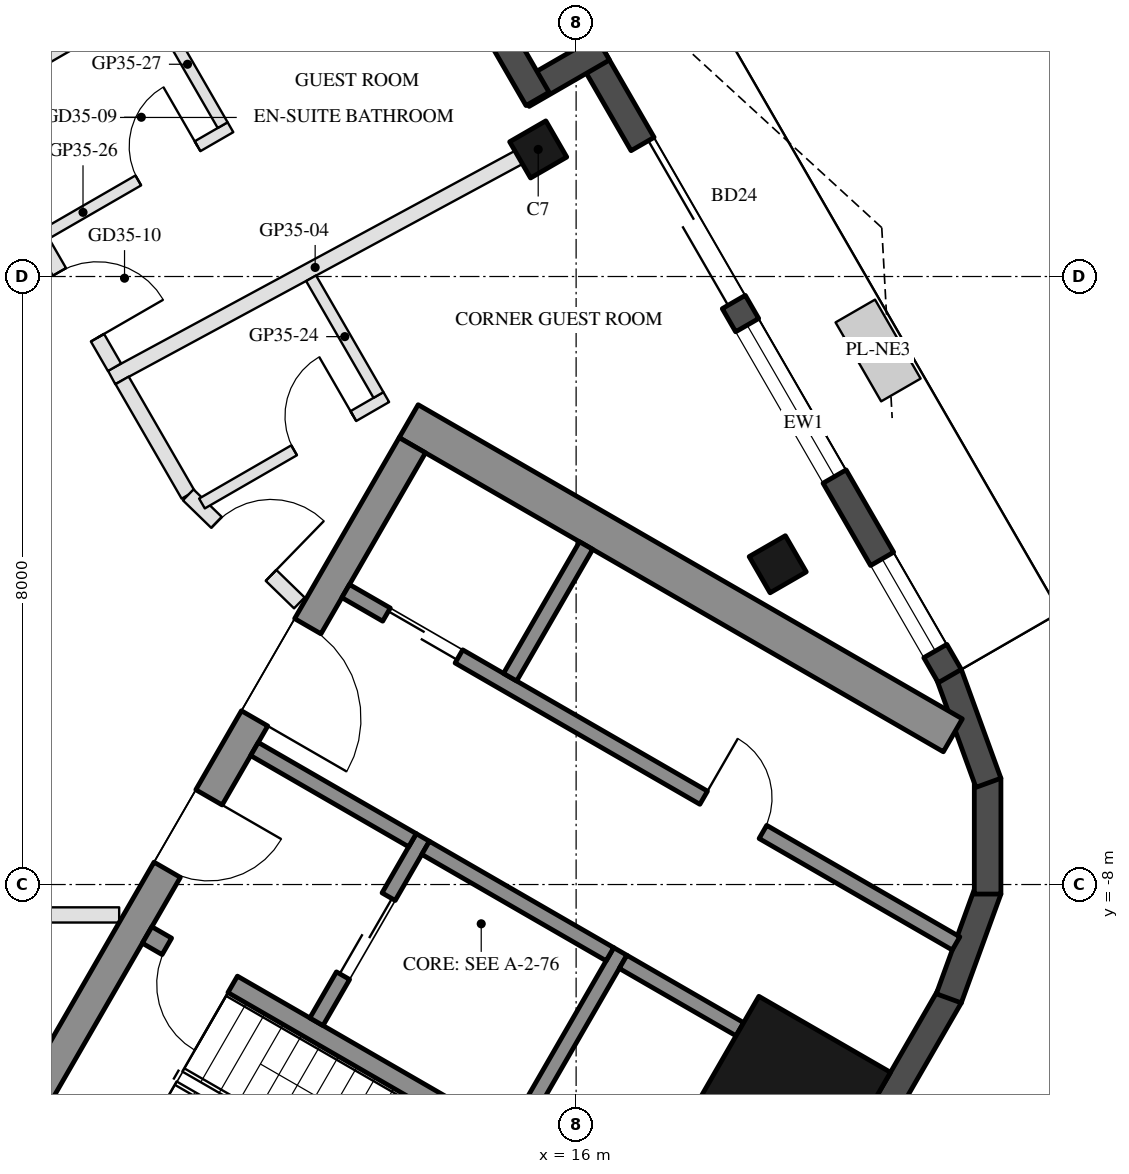
"""IFC4 building model, lengths in metres.
Left out: names, types, materials, properties, quantities, classifications, styles, units other than length and angle.
Written with IfcOpenShell. Run it as: python <this file> out.ifc"""

import sys

from ifc_helpers import new_model, si_unit, direction, frame, frame_2d, origin, origin_2d, place, context, subcontext, project, spatial, rectangle, hollow_rectangle, extrude, boolean, halfspace, element, fill, save


model = new_model("IFC4")
c1 = context("Model", 3, precision=1e-05, world=origin(), true_north=direction((0.0, 1.0)))
c2 = subcontext(c1, "Body", "Model", "MODEL_VIEW")
j1 = project(units=[si_unit("LENGTHUNIT", "METRE"), si_unit("PLANEANGLEUNIT", "RADIAN")], contexts=[c1])
p1 = place(None, origin())
s1 = spatial("IfcSite", under=j1, at=p1, CompositionType="ELEMENT")
p2 = place(p1, origin())
s2 = spatial("IfcBuilding", under=s1, at=p2, CompositionType="ELEMENT")
p3 = place(p2, frame((0.0, 0.0, 324.4)))
s3 = spatial("IfcBuildingStorey", under=s2, at=p3, CompositionType="ELEMENT", Elevation=324.4)
p4 = place(p3, frame((18.652, -3.786, 0.0), z_axis=(0.0, 0.0, 1.0), x_axis=(-0.5, 0.866025403784, 0.0)))
e1 = element("IfcColumn", 1, at=p4, inside=s3, PredefinedType="COLUMN", context=c2, shape_type="SweptSolid", body=[
    boolean("DIFFERENCE", boolean("DIFFERENCE", extrude(hollow_rectangle(XDim=0.55, YDim=0.55, WallThickness=0.025, at=origin_2d()), origin(), (0.0, 0.0, 1.0), 3.7), halfspace(frame((0.0, 0.0, 0.04), z_axis=(0.0, 0.0, 1.0), x_axis=(1.0, 0.0, 0.0)), True)), halfspace(frame((0.0, 0.0, 3.66), z_axis=(0.0, 0.0, 1.0), x_axis=(1.0, 0.0, 0.0)), False)),
])
p5 = place(p3, frame((15.501, 1.672, 0.0), z_axis=(0.0, 0.0, 1.0), x_axis=(-0.5, 0.866025403784, 0.0)))
e2 = element("IfcColumn", 2, at=p5, inside=s3, PredefinedType="COLUMN", context=c2, shape_type="SweptSolid", body=[
    boolean("DIFFERENCE", boolean("DIFFERENCE", extrude(hollow_rectangle(XDim=0.55, YDim=0.55, WallThickness=0.025, at=origin_2d()), origin(), (0.0, 0.0, 1.0), 3.7), halfspace(frame((0.0, 0.0, 0.034), z_axis=(0.0, 0.0, 1.0), x_axis=(1.0, 0.0, 0.0)), True)), halfspace(frame((0.0, 0.0, 3.666), z_axis=(0.0, 0.0, 1.0), x_axis=(1.0, 0.0, 0.0)), False)),
])
p6 = place(p3, frame((18.77, -10.837, 0.0), z_axis=(0.0, 0.0, 1.0), x_axis=(0.5, 0.866025403784, 0.0)))
e3 = element("IfcColumn", 3, at=p6, inside=s3, PredefinedType="COLUMN", context=c2, shape_type="SweptSolid", body=[
    boolean("DIFFERENCE", boolean("DIFFERENCE", extrude(hollow_rectangle(XDim=2.0, YDim=2.0, WallThickness=0.05, at=origin_2d()), origin(), (0.0, 0.0, 1.0), 3.7), halfspace(frame((0.0, 0.0, 0.113), z_axis=(0.0, 0.0, 1.0), x_axis=(1.0, 0.0, 0.0)), True)), halfspace(frame((0.0, 0.0, 3.587), z_axis=(0.0, 0.0, 1.0), x_axis=(1.0, 0.0, 0.0)), False)),
])
p7 = place(p3, frame((18.659, -13.379, 0.0), z_axis=(0.0, 0.0, 1.0), x_axis=(0.500042384281, 0.866000931825, 0.0)))
e4 = element("IfcWall", 4, at=p7, inside=s3, PredefinedType="SOLIDWALL", context=c2, shape_type="SweptSolid", body=[
    extrude(rectangle(XDim=4.514, YDim=0.35, at=frame_2d((2.257, 0.0))), origin(), (0.0, 0.0, 1.0), 3.55),
])
for number, where, z_axis, x_axis in (
    (5, (20.903, -9.498, 0.0), (0.0, 0.0, 1.0), (0.342, 0.94, 0.0)),
    (6, (21.414, -8.125, 0.0), (0.0, 0.0, 1.0), (0.0, 1.0, 0.0)),
    (7, (21.425, -6.662, 0.0), (0.0, 0.0, 1.0), (-0.342, 0.94, 0.0)),
):
    element("IfcWall", number, at=place(p3, frame(where, z_axis=z_axis, x_axis=x_axis)), inside=s3, PredefinedType="SOLIDWALL", context=c2, shape_type="SweptSolid", body=[
        extrude(rectangle(XDim=1.524, YDim=0.35, at=frame_2d((0.762, 0.0))), origin(), (0.0, 0.0, 1.0), 3.55),
    ])
p8 = place(p3, frame((20.916, -5.257, 0.0), z_axis=(0.0, 0.0, 1.0), x_axis=(-0.500022310942, 0.866012522173, 0.0)))
e8 = element("IfcWall", 8, at=p8, inside=s3, PredefinedType="SOLIDWALL", context=c2, shape_type="SweptSolid", body=[
    extrude(rectangle(XDim=9.608, YDim=0.35, at=frame_2d((4.804, 0.0))), origin(), (0.0, 0.0, 1.0), 3.55),
])
p9 = place(p8, frame((0.381, 0.0, 0.3)))
e9 = element("IfcOpeningElement", 9, at=p9, cuts=e8, PredefinedType="OPENING", context=c2, shape_type="SweptSolid", body=[
    extrude(rectangle(XDim=1.4, YDim=2.65, at=frame_2d((0.7, 1.325))), frame((0.0, 0.185, 0.0), z_axis=(0.0, -1.0, 0.0), x_axis=(1.0, 0.0, 0.0)), (0.0, 0.0, 1.0), 0.37),
])
p10 = place(p8, frame((5.683, 0.0, 0.0)))
e10 = element("IfcOpeningElement", 10, at=p10, cuts=e8, PredefinedType="OPENING", context=c2, shape_type="SweptSolid", body=[
    extrude(rectangle(XDim=2.4, YDim=2.4, at=frame_2d((1.2, 1.2))), frame((0.0, 0.185, 0.0), z_axis=(0.0, -1.0, 0.0), x_axis=(1.0, 0.0, 0.0)), (0.0, 0.0, 1.0), 0.37),
])
p11 = place(p8, frame((3.031, 0.0, 0.3)))
e11 = element("IfcOpeningElement", 11, at=p11, cuts=e8, PredefinedType="OPENING", context=c2, shape_type="SweptSolid", body=[
    extrude(rectangle(XDim=2.3, YDim=2.65, at=frame_2d((1.15, 1.325))), frame((0.0, 0.185, 0.0), z_axis=(0.0, -1.0, 0.0), x_axis=(1.0, 0.0, 0.0)), (0.0, 0.0, 1.0), 0.37),
])
p12 = place(p3, frame((16.351, 3.0, 0.0), z_axis=(0.0, 0.0, 1.0), x_axis=(-0.866005645448, -0.500034220881, 0.0)))
e12 = element("IfcWall", 12, at=p12, inside=s3, PredefinedType="SOLIDWALL", context=c2, shape_type="SweptSolid", body=[
    extrude(rectangle(XDim=1.22, YDim=0.35, at=frame_2d((0.61, 0.0))), origin(), (0.0, 0.0, 1.0), 3.55),
])
p13 = place(p3, frame((15.492, 2.337, 0.0), z_axis=(0.0, 0.0, 1.0), x_axis=(-0.499999159329, 0.866025889145, 0.0)))
e13 = element("IfcWall", 13, at=p13, inside=s3, PredefinedType="SOLIDWALL", context=c2, shape_type="SweptSolid", body=[
    extrude(rectangle(XDim=5.143, YDim=0.35, at=frame_2d((2.571, 0.0))), origin(), (0.0, 0.0, 1.0), 3.55),
])
p14 = place(p13, frame((1.122, 0.0, 0.0)))
e14 = element("IfcOpeningElement", 14, at=p14, cuts=e13, PredefinedType="OPENING", context=c2, shape_type="SweptSolid", body=[
    extrude(rectangle(XDim=1.8, YDim=2.4, at=frame_2d((0.9, 1.2))), frame((0.0, 0.185, 0.0), z_axis=(0.0, -1.0, 0.0), x_axis=(1.0, 0.0, 0.0)), (0.0, 0.0, 1.0), 0.37),
])
p15 = place(p3, frame((13.797, -1.903, 0.0), z_axis=(0.0, 0.0, 1.0), x_axis=(0.866030186143, -0.49999171662, 0.0)))
e15 = element("IfcWall", 15, at=p15, inside=s3, PredefinedType="SHEAR", context=c2, shape_type="SweptSolid", body=[
    extrude(rectangle(XDim=8.267, YDim=0.5, at=frame_2d((4.134, 0.0))), origin(), (0.0, 0.0, 1.0), 3.5),
])
p16 = place(p3, frame((8.845, -10.88, 0.0), z_axis=(0.0, 0.0, 1.0), x_axis=(0.500004234368, 0.866022959057, 0.0)))
e16 = element("IfcWall", 16, at=p16, inside=s3, PredefinedType="SHEAR", context=c2, shape_type="SweptSolid", body=[
    extrude(rectangle(XDim=10.0, YDim=0.4, at=frame_2d((5.0, 0.0))), origin(), (0.0, 0.0, 1.0), 3.5),
])
p17 = place(p16, frame((3.55, 0.0, 0.0)))
e17 = element("IfcOpeningElement", 17, at=p17, cuts=e16, PredefinedType="OPENING", context=c2, shape_type="SweptSolid", body=[
    extrude(rectangle(XDim=1.1, YDim=2.1, at=frame_2d((0.55, 1.05))), frame((0.0, 0.21, 0.0), z_axis=(0.0, -1.0, 0.0), x_axis=(1.0, 0.0, 0.0)), (0.0, 0.0, 1.0), 0.42),
])
p18 = place(p16, frame((5.85, 0.0, 0.0)))
e18 = element("IfcOpeningElement", 18, at=p18, cuts=e16, PredefinedType="OPENING", context=c2, shape_type="SweptSolid", body=[
    extrude(rectangle(XDim=1.4, YDim=2.1, at=frame_2d((0.7, 1.05))), frame((0.0, 0.21, 0.0), z_axis=(0.0, -1.0, 0.0), x_axis=(1.0, 0.0, 0.0)), (0.0, 0.0, 1.0), 0.42),
])
p19 = place(p3, frame((10.356, -8.664, 0.0), z_axis=(0.0, 0.0, 1.0), x_axis=(0.866028629588, -0.499994412703, 0.0)))
e19 = element("IfcWall", 19, at=p19, inside=s3, PredefinedType="SHEAR", context=c2, shape_type="SweptSolid", body=[
    extrude(rectangle(XDim=6.45, YDim=0.25, at=frame_2d((3.225, 0.0))), origin(), (0.0, 0.0, 1.0), 3.5),
])
p20 = place(p19, frame((0.3, 0.0, 0.0)))
e20 = element("IfcOpeningElement", 20, at=p20, cuts=e19, PredefinedType="OPENING", context=c2, shape_type="SweptSolid", body=[
    extrude(rectangle(XDim=1.0, YDim=2.1, at=frame_2d((0.5, 1.05))), frame((0.0, 0.135, 0.0), z_axis=(0.0, -1.0, 0.0), x_axis=(1.0, 0.0, 0.0)), (0.0, 0.0, 1.0), 0.27),
])
p21 = place(p3, frame((15.181, -11.305, 0.0), z_axis=(0.0, 0.0, 1.0), x_axis=(0.49994636267, 0.866056369097, 0.0)))
e21 = element("IfcWall", 21, at=p21, inside=s3, PredefinedType="SHEAR", context=c2, shape_type="SweptSolid", body=[
    extrude(rectangle(XDim=2.8, YDim=0.2, at=frame_2d((1.4, 0.0))), origin(), (0.0, 0.0, 1.0), 3.5),
])
p22 = place(p3, frame((12.583, -9.805, 0.0), z_axis=(0.0, 0.0, 1.0), x_axis=(0.49994636267, 0.866056369097, 0.0)))
e22 = element("IfcWall", 22, at=p22, inside=s3, PredefinedType="SHEAR", context=c2, shape_type="SweptSolid", body=[
    extrude(rectangle(XDim=2.8, YDim=0.2, at=frame_2d((1.4, 0.0))), origin(), (0.0, 0.0, 1.0), 3.5),
])
p23 = place(p22, frame((0.7, 0.0, 0.0)))
e23 = element("IfcOpeningElement", 23, at=p23, cuts=e22, PredefinedType="OPENING", context=c2, shape_type="SweptSolid", body=[
    extrude(rectangle(XDim=1.2, YDim=2.1, at=frame_2d((0.6, 1.05))), frame((0.0, 0.11, 0.0), z_axis=(0.0, -1.0, 0.0), x_axis=(1.0, 0.0, 0.0)), (0.0, 0.0, 1.0), 0.22),
])
p24 = place(p3, frame((11.768, -6.217, 0.0), z_axis=(0.0, 0.0, 1.0), x_axis=(0.866050077142, -0.499957262057, 0.0)))
e24 = element("IfcWall", 24, at=p24, inside=s3, PredefinedType="SHEAR", context=c2, shape_type="SweptSolid", body=[
    extrude(rectangle(XDim=2.4, YDim=0.2, at=frame_2d((1.2, 0.0))), origin(), (0.0, 0.0, 1.0), 3.5),
])
p25 = place(p3, frame((14.02, -7.517, 0.0), z_axis=(0.0, 0.0, 1.0), x_axis=(0.866034573852, -0.49998411664, 0.0)))
e25 = element("IfcWall", 25, at=p25, inside=s3, PredefinedType="SHEAR", context=c2, shape_type="SweptSolid", body=[
    extrude(rectangle(XDim=2.8, YDim=0.2, at=frame_2d((1.4, 0.0))), origin(), (0.0, 0.0, 1.0), 3.5),
])
p26 = place(p3, frame((12.968, -4.138, 0.0), z_axis=(0.0, 0.0, 1.0), x_axis=(0.866022923061, -0.500004296715, 0.0)))
e26 = element("IfcWall", 26, at=p26, inside=s3, PredefinedType="SHEAR", context=c2, shape_type="SweptSolid", body=[
    extrude(rectangle(XDim=9.273, YDim=0.2, at=frame_2d((4.636, 0.0))), origin(), (0.0, 0.0, 1.0), 3.5),
])
p27 = place(p26, frame((0.62, 0.0, 0.0)))
e27 = element("IfcOpeningElement", 27, at=p27, cuts=e26, PredefinedType="OPENING", context=c2, shape_type="SweptSolid", body=[
    extrude(rectangle(XDim=1.1, YDim=2.1, at=frame_2d((0.55, 1.05))), frame((0.0, 0.11, 0.0), z_axis=(0.0, -1.0, 0.0), x_axis=(1.0, 0.0, 0.0)), (0.0, 0.0, 1.0), 0.22),
])
p28 = place(p26, frame((5.439, 0.0, 0.0)))
e28 = element("IfcOpeningElement", 28, at=p28, cuts=e26, PredefinedType="OPENING", context=c2, shape_type="SweptSolid", body=[
    extrude(rectangle(XDim=0.9, YDim=2.1, at=frame_2d((0.45, 1.05))), frame((0.0, 0.11, 0.0), z_axis=(0.0, -1.0, 0.0), x_axis=(1.0, 0.0, 0.0)), (0.0, 0.0, 1.0), 0.22),
])
p29 = place(p3, frame((16.618, -9.017, 0.0), z_axis=(0.0, 0.0, 1.0), x_axis=(0.866066400931, -0.499928984136, 0.0)))
e29 = element("IfcWall", 29, at=p29, inside=s3, PredefinedType="SHEAR", context=c2, shape_type="SweptSolid", body=[
    extrude(rectangle(XDim=1.774, YDim=0.2, at=frame_2d((0.887, 0.0))), origin(), (0.0, 0.0, 1.0), 3.5),
])
p30 = place(p3, frame((15.131, -5.272, 0.0), z_axis=(0.0, 0.0, 1.0), x_axis=(0.499972520799, 0.866041268327, 0.0)))
e30 = element("IfcWall", 30, at=p30, inside=s3, PredefinedType="SHEAR", context=c2, shape_type="SweptSolid", body=[
    extrude(rectangle(XDim=2.0, YDim=0.2, at=frame_2d((1.0, 0.0))), origin(), (0.0, 0.0, 1.0), 3.5),
])
p31 = place(p3, frame((15.244, 1.567, 0.0), z_axis=(0.0, 0.0, 1.0), x_axis=(-0.879711500968, -0.475507807575, 0.0)))
e31 = element("IfcWall", 31, at=p31, inside=s3, PredefinedType="PARTITIONING", context=c2, shape_type="SweptSolid", body=[
    extrude(rectangle(XDim=6.088, YDim=0.2, at=frame_2d((3.044, 0.0))), origin(), (0.0, 0.0, 1.0), 3.15),
])
p32 = place(p3, frame((13.48, 5.473, 0.0), z_axis=(0.0, 0.0, 1.0), x_axis=(-0.866030715483, -0.499990799755, 0.0)))
e32 = element("IfcWall", 32, at=p32, inside=s3, PredefinedType="PARTITIONING", context=c2, shape_type="SweptSolid", body=[
    extrude(rectangle(XDim=6.51, YDim=0.2, at=frame_2d((3.255, 0.0))), origin(), (0.0, 0.0, 1.0), 3.1),
])
p33 = place(p3, frame((9.988, -8.4, 0.0), z_axis=(0.0, 0.0, 1.0), x_axis=(-1.0, 0.0, 0.0)))
e33 = element("IfcWall", 33, at=p33, inside=s3, PredefinedType="PARTITIONING", context=c2, shape_type="SweptSolid", body=[
    extrude(rectangle(XDim=5.904, YDim=0.2, at=frame_2d((2.952, 0.0))), origin(), (0.0, 0.0, 1.0), 3.15),
])
p34 = place(p33, frame((1.908, 0.0, 0.0)))
e34 = element("IfcOpeningElement", 34, at=p34, cuts=e33, PredefinedType="OPENING", context=c2, shape_type="SweptSolid", body=[
    extrude(rectangle(XDim=1.0, YDim=2.1, at=frame_2d((0.5, 1.05))), frame((0.0, 0.11, 0.0), z_axis=(0.0, -1.0, 0.0), x_axis=(1.0, 0.0, 0.0)), (0.0, 0.0, 1.0), 0.22),
])
p35 = place(p3, frame((10.027, -1.367, 0.0), z_axis=(0.0, 0.0, 1.0), x_axis=(0.499973559465, -0.866040668696, 0.0)))
e35 = element("IfcWall", 35, at=p35, inside=s3, PredefinedType="PARTITIONING", context=c2, shape_type="SweptSolid", body=[
    extrude(rectangle(XDim=1.739, YDim=0.2, at=frame_2d((0.87, 0.0))), origin(), (0.0, 0.0, 1.0), 3.15),
])
p36 = place(p3, frame((10.896, -2.873, 0.0), z_axis=(0.0, 0.0, 1.0), x_axis=(0.716974970554, -0.697098910916, 0.0)))
e36 = element("IfcWall", 36, at=p36, inside=s3, PredefinedType="PARTITIONING", context=c2, shape_type="SweptSolid", body=[
    extrude(rectangle(XDim=2.039, YDim=0.2, at=frame_2d((1.02, 0.0))), origin(), (0.0, 0.0, 1.0), 3.55),
])
p37 = place(p36, frame((0.52, 0.0, 0.0)))
e37 = element("IfcOpeningElement", 37, at=p37, cuts=e36, PredefinedType="OPENING", context=c2, shape_type="SweptSolid", body=[
    extrude(rectangle(XDim=1.0, YDim=2.1, at=frame_2d((0.5, 1.05))), frame((0.0, 0.11, 0.0), z_axis=(0.0, -1.0, 0.0), x_axis=(1.0, 0.0, 0.0)), (0.0, 0.0, 1.0), 0.22),
])
p38 = place(p3, frame((11.077, -2.987, 0.0), z_axis=(0.0, 0.0, 1.0), x_axis=(0.865996816683, 0.500049511043, 0.0)))
e38 = element("IfcWall", 38, at=p38, inside=s3, PredefinedType="PARTITIONING", context=c2, shape_type="SweptSolid", body=[
    extrude(rectangle(XDim=2.8, YDim=0.15, at=frame_2d((1.4, 0.0))), origin(), (0.0, 0.0, 1.0), 3.55),
])
p39 = place(p38, frame((1.4, 0.0, 0.0)))
e39 = element("IfcOpeningElement", 39, at=p39, cuts=e38, PredefinedType="OPENING", context=c2, shape_type="SweptSolid", body=[
    extrude(rectangle(XDim=0.9, YDim=2.1, at=frame_2d((0.45, 1.05))), frame((0.0, 0.085, 0.0), z_axis=(0.0, -1.0, 0.0), x_axis=(1.0, 0.0, 0.0)), (0.0, 0.0, 1.0), 0.17),
])
p40 = place(p3, frame((13.4, -1.559, 0.0), z_axis=(0.0, 0.0, 1.0), x_axis=(-0.499988586725, 0.866031993141, 0.0)))
e40 = element("IfcWall", 40, at=p40, inside=s3, PredefinedType="PARTITIONING", context=c2, shape_type="SweptSolid", body=[
    extrude(rectangle(XDim=1.773, YDim=0.15, at=frame_2d((0.887, 0.0))), origin(), (0.0, 0.0, 1.0), 3.15),
])
p41 = place(p3, frame((7.978, 2.181, 0.0), z_axis=(0.0, 0.0, 1.0), x_axis=(0.499986368499, -0.866033273792, 0.0)))
e41 = element("IfcWall", 41, at=p41, inside=s3, PredefinedType="PARTITIONING", context=c2, shape_type="SweptSolid", body=[
    extrude(rectangle(XDim=3.897, YDim=0.2, at=frame_2d((1.948, 0.0))), origin(), (0.0, 0.0, 1.0), 3.15),
])
p42 = place(p41, frame((2.448, 0.0, 0.0)))
e42 = element("IfcOpeningElement", 42, at=p42, cuts=e41, PredefinedType="OPENING", context=c2, shape_type="SweptSolid", body=[
    extrude(rectangle(XDim=1.0, YDim=2.1, at=frame_2d((0.5, 1.05))), frame((0.0, 0.11, 0.0), z_axis=(0.0, -1.0, 0.0), x_axis=(1.0, 0.0, 0.0)), (0.0, 0.0, 1.0), 0.22),
])
p43 = place(p3, frame((9.027, 0.564, 0.0), z_axis=(0.0, 0.0, 1.0), x_axis=(0.866034573852, 0.49998411664, 0.0)))
e43 = element("IfcWall", 43, at=p43, inside=s3, PredefinedType="PARTITIONING", context=c2, shape_type="SweptSolid", body=[
    extrude(rectangle(XDim=2.8, YDim=0.15, at=frame_2d((1.4, 0.0))), origin(), (0.0, 0.0, 1.0), 3.55),
])
p44 = place(p43, frame((1.4, 0.0, 0.0)))
e44 = element("IfcOpeningElement", 44, at=p44, cuts=e43, PredefinedType="OPENING", context=c2, shape_type="SweptSolid", body=[
    extrude(rectangle(XDim=0.9, YDim=2.1, at=frame_2d((0.45, 1.05))), frame((0.0, 0.085, 0.0), z_axis=(0.0, -1.0, 0.0), x_axis=(1.0, 0.0, 0.0)), (0.0, 0.0, 1.0), 0.17),
])
p45 = place(p3, frame((11.35, 1.992, 0.0), z_axis=(0.0, 0.0, 1.0), x_axis=(-0.49994333299, 0.866058118026, 0.0)))
e45 = element("IfcWall", 45, at=p45, inside=s3, PredefinedType="PARTITIONING", context=c2, shape_type="SweptSolid", body=[
    extrude(rectangle(XDim=1.85, YDim=0.15, at=frame_2d((0.925, 0.0))), origin(), (0.0, 0.0, 1.0), 3.15),
])
p46 = place(p9, origin())
e46 = element("IfcWindow", 46, at=p46, inside=s3, PartitioningType="SINGLE_PANEL", PredefinedType="WINDOW", context=c2, shape_type="SweptSolid", body=[
    extrude(rectangle(XDim=1.4, YDim=2.65, at=frame_2d((0.7, 1.325))), frame((0.0, 0.03, 0.0), z_axis=(0.0, -1.0, 0.0), x_axis=(1.0, 0.0, 0.0)), (0.0, 0.0, 1.0), 0.06),
])
fill(e9, e46)
p47 = place(p10, frame((2.4, 0.0, 0.0), z_axis=(0.0, 0.0, 1.0), x_axis=(-1.0, 0.0, 0.0)))
e47 = element("IfcDoor", 47, at=p47, inside=s3, OperationType="SLIDING_TO_LEFT", PredefinedType="DOOR", context=c2, shape_type="SweptSolid", body=[
    extrude(rectangle(XDim=2.4, YDim=2.4, at=frame_2d((1.2, 1.2))), frame((0.0, 0.025, 0.0), z_axis=(0.0, -1.0, 0.0), x_axis=(1.0, 0.0, 0.0)), (0.0, 0.0, 1.0), 0.05),
])
fill(e10, e47)
p48 = place(p11, origin())
e48 = element("IfcWindow", 48, at=p48, inside=s3, PartitioningType="SINGLE_PANEL", PredefinedType="WINDOW", context=c2, shape_type="SweptSolid", body=[
    extrude(rectangle(XDim=2.3, YDim=2.65, at=frame_2d((1.15, 1.325))), frame((0.0, 0.03, 0.0), z_axis=(0.0, -1.0, 0.0), x_axis=(1.0, 0.0, 0.0)), (0.0, 0.0, 1.0), 0.06),
])
fill(e11, e48)
p49 = place(p23, origin())
e49 = element("IfcDoor", 49, at=p49, inside=s3, OperationType="DOUBLE_DOOR_SLIDING", PredefinedType="DOOR", context=c2, shape_type="SweptSolid", body=[
    extrude(rectangle(XDim=1.2, YDim=2.1, at=frame_2d((0.6, 1.05))), frame((0.0, 0.025, 0.0), z_axis=(0.0, -1.0, 0.0), x_axis=(1.0, 0.0, 0.0)), (0.0, 0.0, 1.0), 0.05),
])
fill(e23, e49)
p50 = place(p27, origin())
e50 = element("IfcDoor", 50, at=p50, inside=s3, OperationType="DOUBLE_DOOR_SLIDING", PredefinedType="DOOR", context=c2, shape_type="SweptSolid", body=[
    extrude(rectangle(XDim=1.1, YDim=2.1, at=frame_2d((0.55, 1.05))), frame((0.0, 0.025, 0.0), z_axis=(0.0, -1.0, 0.0), x_axis=(1.0, 0.0, 0.0)), (0.0, 0.0, 1.0), 0.05),
])
fill(e27, e50)
p51 = place(p28, origin())
e51 = element("IfcDoor", 51, at=p51, inside=s3, OperationType="SINGLE_SWING_LEFT", PredefinedType="DOOR", context=c2, shape_type="SweptSolid", body=[
    extrude(rectangle(XDim=0.9, YDim=2.1, at=frame_2d((0.45, 1.05))), frame((0.0, 0.025, 0.0), z_axis=(0.0, -1.0, 0.0), x_axis=(1.0, 0.0, 0.0)), (0.0, 0.0, 1.0), 0.05),
])
fill(e28, e51)
p52 = place(p17, frame((1.1, 0.0, 0.0), z_axis=(0.0, 0.0, 1.0), x_axis=(-1.0, 0.0, 0.0)))
e52 = element("IfcDoor", 52, at=p52, inside=s3, OperationType="SINGLE_SWING_LEFT", PredefinedType="DOOR", context=c2, shape_type="SweptSolid", body=[
    extrude(rectangle(XDim=1.1, YDim=2.1, at=frame_2d((0.55, 1.05))), frame((0.0, 0.025, 0.0), z_axis=(0.0, -1.0, 0.0), x_axis=(1.0, 0.0, 0.0)), (0.0, 0.0, 1.0), 0.05),
])
fill(e17, e52)
p53 = place(p18, frame((1.4, 0.0, 0.0), z_axis=(0.0, 0.0, 1.0), x_axis=(-1.0, 0.0, 0.0)))
e53 = element("IfcDoor", 53, at=p53, inside=s3, OperationType="DOUBLE_DOOR_SINGLE_SWING", PredefinedType="DOOR", context=c2, shape_type="SweptSolid", body=[
    extrude(rectangle(XDim=1.4, YDim=2.1, at=frame_2d((0.7, 1.05))), frame((0.0, 0.025, 0.0), z_axis=(0.0, -1.0, 0.0), x_axis=(1.0, 0.0, 0.0)), (0.0, 0.0, 1.0), 0.05),
])
fill(e18, e53)
p54 = place(p20, frame((1.0, 0.0, 0.0), z_axis=(0.0, 0.0, 1.0), x_axis=(-1.0, 0.0, 0.0)))
e54 = element("IfcDoor", 54, at=p54, inside=s3, OperationType="SINGLE_SWING_LEFT", PredefinedType="DOOR", context=c2, shape_type="SweptSolid", body=[
    extrude(rectangle(XDim=1.0, YDim=2.1, at=frame_2d((0.5, 1.05))), frame((0.0, 0.025, 0.0), z_axis=(0.0, -1.0, 0.0), x_axis=(1.0, 0.0, 0.0)), (0.0, 0.0, 1.0), 0.05),
])
fill(e20, e54)
p55 = place(p39, origin())
e55 = element("IfcDoor", 55, at=p55, inside=s3, OperationType="SINGLE_SWING_RIGHT", PredefinedType="DOOR", context=c2, shape_type="SweptSolid", body=[
    extrude(rectangle(XDim=0.9, YDim=2.1, at=frame_2d((0.45, 1.05))), frame((0.0, 0.025, 0.0), z_axis=(0.0, -1.0, 0.0), x_axis=(1.0, 0.0, 0.0)), (0.0, 0.0, 1.0), 0.05),
])
fill(e39, e55)
p56 = place(p37, origin())
e56 = element("IfcDoor", 56, at=p56, inside=s3, OperationType="SINGLE_SWING_RIGHT", PredefinedType="DOOR", context=c2, shape_type="SweptSolid", body=[
    extrude(rectangle(XDim=1.0, YDim=2.1, at=frame_2d((0.5, 1.05))), frame((0.0, 0.025, 0.0), z_axis=(0.0, -1.0, 0.0), x_axis=(1.0, 0.0, 0.0)), (0.0, 0.0, 1.0), 0.05),
])
fill(e37, e56)
p57 = place(p44, origin())
e57 = element("IfcDoor", 57, at=p57, inside=s3, OperationType="SINGLE_SWING_RIGHT", PredefinedType="DOOR", context=c2, shape_type="SweptSolid", body=[
    extrude(rectangle(XDim=0.9, YDim=2.1, at=frame_2d((0.45, 1.05))), frame((0.0, 0.025, 0.0), z_axis=(0.0, -1.0, 0.0), x_axis=(1.0, 0.0, 0.0)), (0.0, 0.0, 1.0), 0.05),
])
fill(e44, e57)
p58 = place(p42, origin())
e58 = element("IfcDoor", 58, at=p58, inside=s3, OperationType="SINGLE_SWING_RIGHT", PredefinedType="DOOR", context=c2, shape_type="SweptSolid", body=[
    extrude(rectangle(XDim=1.0, YDim=2.1, at=frame_2d((0.5, 1.05))), frame((0.0, 0.025, 0.0), z_axis=(0.0, -1.0, 0.0), x_axis=(1.0, 0.0, 0.0)), (0.0, 0.0, 1.0), 0.05),
])
fill(e42, e58)
save(model, sys.argv[1])
